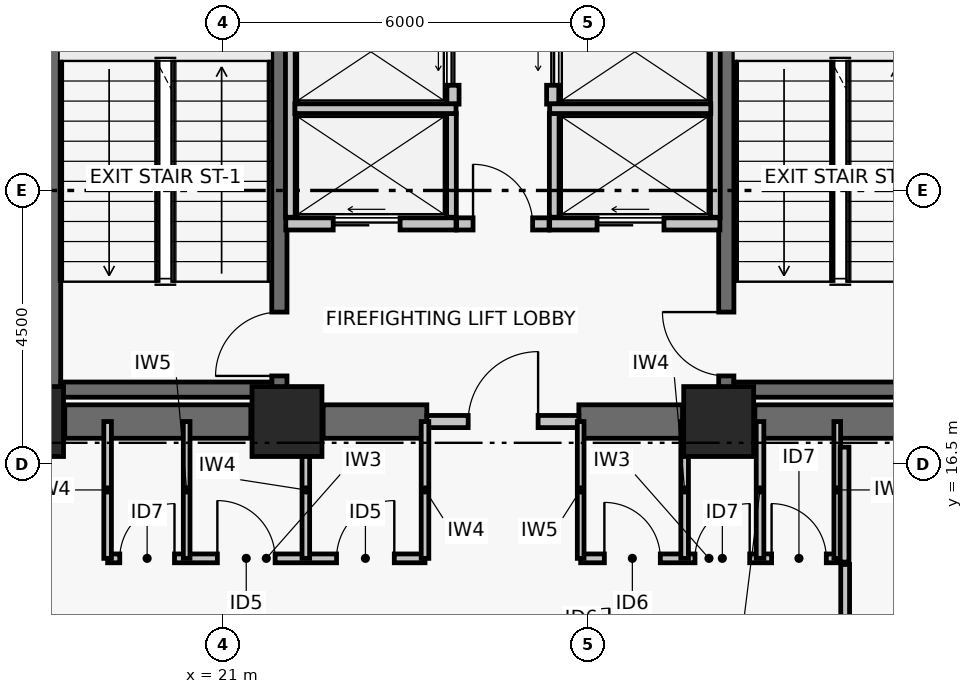
"""IFC4 building model, lengths in metres.
Left out: names, types, materials, properties, quantities, classifications, styles, units other than length and angle.
Written with IfcOpenShell. Run it as: python <this file> out.ifc"""

import sys

from ifc_helpers import new_model, si_unit, direction, frame, frame_2d, origin, origin_2d, place, context, subcontext, project, spatial, rectangle, extrude, element, fill, save


model = new_model("IFC4")
c1 = context("Model", 3, precision=1e-05, world=origin(), true_north=direction((0.0, 1.0)))
c2 = subcontext(c1, "Body", "Model", "MODEL_VIEW")
j1 = project(units=[si_unit("LENGTHUNIT", "METRE"), si_unit("PLANEANGLEUNIT", "RADIAN")], contexts=[c1])
p1 = place(None, origin())
s1 = spatial("IfcSite", under=j1, at=p1, CompositionType="ELEMENT")
p2 = place(p1, origin())
s2 = spatial("IfcBuilding", under=s1, at=p2, CompositionType="ELEMENT")
p3 = place(p2, frame((0.0, 0.0, 89.1)))
s3 = spatial("IfcBuildingStorey", under=s2, at=p3, CompositionType="ELEMENT", Elevation=89.1)
for number, where, z_axis, x_axis in (
    (1, (17.8, 17.2, 0.0), (0.0, 0.0, 1.0), (1.0, 0.0, 0.0)),
    (2, (22.05, 17.2, 0.0), (0.0, 0.0, 1.0), (1.0, 0.0, 0.0)),
    (3, (29.15, 17.2, 0.0), (0.0, 0.0, 1.0), (1.0, 0.0, 0.0)),
):
    element("IfcColumn", number, at=place(p3, frame(where, z_axis=z_axis, x_axis=x_axis)), inside=s3, PredefinedType="COLUMN", context=c2, shape_type="SweptSolid", body=[
        extrude(rectangle(XDim=1.15, YDim=1.15, at=origin_2d()), origin(), (0.0, 0.0, 1.0), 3.72),
    ])
p4 = place(p3, frame((18.395, 17.2, 0.0), z_axis=(0.0, 0.0, 1.0), x_axis=(1.0, 0.0, 0.0)))
e4 = element("IfcWall", 4, at=p4, inside=s3, PredefinedType="SHEAR", context=c2, shape_type="SweptSolid", body=[
    extrude(rectangle(XDim=3.06, YDim=0.55, at=frame_2d((1.53, 0.0))), origin(), (0.0, 0.0, 1.0), 3.47),
])
p5 = place(p3, frame((22.645, 17.2, 0.0), z_axis=(0.0, 0.0, 1.0), x_axis=(1.0, 0.0, 0.0)))
e5 = element("IfcWall", 5, at=p5, inside=s3, PredefinedType="SHEAR", context=c2, shape_type="SweptSolid", body=[
    extrude(rectangle(XDim=1.705, YDim=0.55, at=frame_2d((0.853, 0.0))), origin(), (0.0, 0.0, 1.0), 3.47),
])
p6 = place(p3, frame((26.85, 17.2, 0.0), z_axis=(0.0, 0.0, 1.0), x_axis=(1.0, 0.0, 0.0)))
e6 = element("IfcWall", 6, at=p6, inside=s3, PredefinedType="SHEAR", context=c2, shape_type="SweptSolid", body=[
    extrude(rectangle(XDim=1.705, YDim=0.55, at=frame_2d((0.853, 0.0))), origin(), (0.0, 0.0, 1.0), 3.47),
])
p7 = place(p3, frame((29.745, 17.2, 0.0), z_axis=(0.0, 0.0, 1.0), x_axis=(1.0, 0.0, 0.0)))
e7 = element("IfcWall", 7, at=p7, inside=s3, PredefinedType="SHEAR", context=c2, shape_type="SweptSolid", body=[
    extrude(rectangle(XDim=3.06, YDim=0.55, at=frame_2d((1.53, 0.0))), origin(), (0.0, 0.0, 1.0), 3.47),
])
p8 = place(p3, frame((18.204, 17.6, 0.0), z_axis=(0.0, 0.0, 1.0), x_axis=(0.0, 1.0, 0.0)))
e8 = element("IfcWall", 8, at=p8, inside=s3, PredefinedType="SHEAR", context=c2, shape_type="SweptSolid", body=[
    extrude(rectangle(XDim=8.8, YDim=0.25, at=frame_2d((4.4, 0.0))), origin(), (0.0, 0.0, 1.0), 3.47),
])
p9 = place(p3, frame((21.925, 17.6, 0.0), z_axis=(0.0, 0.0, 1.0), x_axis=(0.0, 1.0, 0.0)))
e9 = element("IfcWall", 9, at=p9, inside=s3, PredefinedType="SHEAR", context=c2, shape_type="SweptSolid", body=[
    extrude(rectangle(XDim=8.8, YDim=0.25, at=frame_2d((4.4, 0.0))), origin(), (0.0, 0.0, 1.0), 3.47),
])
p10 = place(p9, frame((0.35, 0.0, 0.0)))
e10 = element("IfcOpeningElement", 10, at=p10, cuts=e9, PredefinedType="OPENING", context=c2, shape_type="SweptSolid", body=[
    extrude(rectangle(XDim=1.05, YDim=2.08, at=frame_2d((0.525, 1.04))), frame((0.0, 0.135, 0.0), z_axis=(0.0, -1.0, 0.0), x_axis=(1.0, 0.0, 0.0)), (0.0, 0.0, 1.0), 0.27),
])
p11 = place(p3, frame((18.329, 17.725, 0.0), z_axis=(0.0, 0.0, 1.0), x_axis=(1.0, 0.0, 0.0)))
e11 = element("IfcWall", 11, at=p11, inside=s3, PredefinedType="SHEAR", context=c2, shape_type="SweptSolid", body=[
    extrude(rectangle(XDim=3.471, YDim=0.25, at=frame_2d((1.735, 0.0))), origin(), (0.0, 0.0, 1.0), 3.47),
])
p12 = place(p3, frame((29.275, 17.6, 0.0), z_axis=(0.0, 0.0, 1.0), x_axis=(0.0, 1.0, 0.0)))
e12 = element("IfcWall", 12, at=p12, inside=s3, PredefinedType="SHEAR", context=c2, shape_type="SweptSolid", body=[
    extrude(rectangle(XDim=8.8, YDim=0.25, at=frame_2d((4.4, 0.0))), origin(), (0.0, 0.0, 1.0), 3.47),
])
p13 = place(p12, frame((0.35, 0.0, 0.0)))
e13 = element("IfcOpeningElement", 13, at=p13, cuts=e12, PredefinedType="OPENING", context=c2, shape_type="SweptSolid", body=[
    extrude(rectangle(XDim=1.05, YDim=2.08, at=frame_2d((0.525, 1.04))), frame((0.0, 0.135, 0.0), z_axis=(0.0, -1.0, 0.0), x_axis=(1.0, 0.0, 0.0)), (0.0, 0.0, 1.0), 0.27),
])
p14 = place(p3, frame((29.4, 17.725, 0.0), z_axis=(0.0, 0.0, 1.0), x_axis=(1.0, 0.0, 0.0)))
e14 = element("IfcWall", 14, at=p14, inside=s3, PredefinedType="SHEAR", context=c2, shape_type="SweptSolid", body=[
    extrude(rectangle(XDim=3.471, YDim=0.25, at=frame_2d((1.736, 0.0))), origin(), (0.0, 0.0, 1.0), 3.47),
])
p15 = place(p3, frame((24.35, 17.2, 0.0), z_axis=(0.0, 0.0, 1.0), x_axis=(1.0, 0.0, 0.0)))
e15 = element("IfcWall", 15, at=p15, inside=s3, PredefinedType="PARTITIONING", context=c2, shape_type="SweptSolid", body=[
    extrude(rectangle(XDim=2.5, YDim=0.2, at=frame_2d((1.25, 0.0))), origin(), (0.0, 0.0, 1.0), 2.6),
])
p16 = place(p15, frame((0.68, 0.0, 0.0)))
e16 = element("IfcOpeningElement", 16, at=p16, cuts=e15, PredefinedType="OPENING", context=c2, shape_type="SweptSolid", body=[
    extrude(rectangle(XDim=1.15, YDim=2.08, at=frame_2d((0.575, 1.04))), frame((0.0, 0.11, 0.0), z_axis=(0.0, -1.0, 0.0), x_axis=(1.0, 0.0, 0.0)), (0.0, 0.0, 1.0), 0.22),
])
p17 = place(p3, frame((24.84, 20.45, 0.0), z_axis=(0.0, 0.0, 1.0), x_axis=(1.0, 0.0, 0.0)))
e17 = element("IfcWall", 17, at=p17, inside=s3, PredefinedType="PARTITIONING", context=c2, shape_type="SweptSolid", body=[
    extrude(rectangle(XDim=1.52, YDim=0.2, at=frame_2d((0.76, 0.0))), origin(), (0.0, 0.0, 1.0), 3.47),
])
p18 = place(p17, frame((0.27, 0.0, 0.0)))
e18 = element("IfcOpeningElement", 18, at=p18, cuts=e17, PredefinedType="OPENING", context=c2, shape_type="SweptSolid", body=[
    extrude(rectangle(XDim=0.98, YDim=2.06, at=frame_2d((0.49, 1.03))), frame((0.0, 0.11, 0.0), z_axis=(0.0, -1.0, 0.0), x_axis=(1.0, 0.0, 0.0)), (0.0, 0.0, 1.0), 0.22),
])
p19 = place(p3, frame((22.03, 20.45, 0.0), z_axis=(0.0, 0.0, 1.0), x_axis=(1.0, 0.0, 0.0)))
e19 = element("IfcWall", 19, at=p19, inside=s3, PredefinedType="PARTITIONING", context=c2, shape_type="SweptSolid", body=[
    extrude(rectangle(XDim=2.8, YDim=0.2, at=frame_2d((1.4, 0.0))), origin(), (0.0, 0.0, 1.0), 3.47),
])
p20 = place(p19, frame((0.78, 0.0, 0.0)))
e20 = element("IfcOpeningElement", 20, at=p20, cuts=e19, PredefinedType="OPENING", context=c2, shape_type="SweptSolid", body=[
    extrude(rectangle(XDim=1.1, YDim=2.08, at=frame_2d((0.55, 1.04))), frame((0.0, 0.11, 0.0), z_axis=(0.0, -1.0, 0.0), x_axis=(1.0, 0.0, 0.0)), (0.0, 0.0, 1.0), 0.22),
])
p21 = place(p3, frame((26.37, 20.45, 0.0), z_axis=(0.0, 0.0, 1.0), x_axis=(1.0, 0.0, 0.0)))
e21 = element("IfcWall", 21, at=p21, inside=s3, PredefinedType="PARTITIONING", context=c2, shape_type="SweptSolid", body=[
    extrude(rectangle(XDim=2.8, YDim=0.2, at=frame_2d((1.4, 0.0))), origin(), (0.0, 0.0, 1.0), 3.47),
])
p22 = place(p21, frame((0.78, 0.0, 0.0)))
e22 = element("IfcOpeningElement", 22, at=p22, cuts=e21, PredefinedType="OPENING", context=c2, shape_type="SweptSolid", body=[
    extrude(rectangle(XDim=1.1, YDim=2.08, at=frame_2d((0.55, 1.04))), frame((0.0, 0.11, 0.0), z_axis=(0.0, -1.0, 0.0), x_axis=(1.0, 0.0, 0.0)), (0.0, 0.0, 1.0), 0.22),
])
p23 = place(p3, frame((24.78, 22.42, 0.0), z_axis=(0.0, 0.0, 1.0), x_axis=(0.0, 1.0, 0.0)))
e23 = element("IfcWall", 23, at=p23, inside=s3, PredefinedType="PARTITIONING", context=c2, shape_type="SweptSolid", body=[
    extrude(rectangle(XDim=1.72, YDim=0.2, at=frame_2d((0.86, 0.0))), origin(), (0.0, 0.0, 1.0), 3.47),
])
p24 = place(p23, frame((0.31, 0.0, 0.0)))
e24 = element("IfcOpeningElement", 24, at=p24, cuts=e23, PredefinedType="OPENING", context=c2, shape_type="SweptSolid", body=[
    extrude(rectangle(XDim=1.1, YDim=2.08, at=frame_2d((0.55, 1.04))), frame((0.0, 0.11, 0.0), z_axis=(0.0, -1.0, 0.0), x_axis=(1.0, 0.0, 0.0)), (0.0, 0.0, 1.0), 0.22),
])
p25 = place(p3, frame((26.42, 22.42, 0.0), z_axis=(0.0, 0.0, 1.0), x_axis=(0.0, 1.0, 0.0)))
e25 = element("IfcWall", 25, at=p25, inside=s3, PredefinedType="PARTITIONING", context=c2, shape_type="SweptSolid", body=[
    extrude(rectangle(XDim=1.72, YDim=0.2, at=frame_2d((0.86, 0.0))), origin(), (0.0, 0.0, 1.0), 3.47),
])
p26 = place(p25, frame((0.31, 0.0, 0.0)))
e26 = element("IfcOpeningElement", 26, at=p26, cuts=e25, PredefinedType="OPENING", context=c2, shape_type="SweptSolid", body=[
    extrude(rectangle(XDim=1.1, YDim=2.08, at=frame_2d((0.55, 1.04))), frame((0.0, 0.11, 0.0), z_axis=(0.0, -1.0, 0.0), x_axis=(1.0, 0.0, 0.0)), (0.0, 0.0, 1.0), 0.22),
])
p27 = place(p3, frame((22.105, 20.56, 0.0), z_axis=(0.0, 0.0, 1.0), x_axis=(0.0, 1.0, 0.0)))
e27 = element("IfcWall", 27, at=p27, inside=s3, PredefinedType="PARTITIONING", context=c2, shape_type="SweptSolid", body=[
    extrude(rectangle(XDim=5.45, YDim=0.16, at=frame_2d((2.725, 0.0))), origin(), (0.0, 0.0, 1.0), 3.47),
])
p28 = place(p3, frame((24.755, 20.56, 0.0), z_axis=(0.0, 0.0, 1.0), x_axis=(0.0, 1.0, 0.0)))
e28 = element("IfcWall", 28, at=p28, inside=s3, PredefinedType="PARTITIONING", context=c2, shape_type="SweptSolid", body=[
    extrude(rectangle(XDim=1.71, YDim=0.16, at=frame_2d((0.855, 0.0))), origin(), (0.0, 0.0, 1.0), 3.47),
])
p29 = place(p3, frame((22.18, 22.345, 0.0), z_axis=(0.0, 0.0, 1.0), x_axis=(1.0, 0.0, 0.0)))
e29 = element("IfcWall", 29, at=p29, inside=s3, PredefinedType="PARTITIONING", context=c2, shape_type="SweptSolid", body=[
    extrude(rectangle(XDim=2.65, YDim=0.16, at=frame_2d((1.325, 0.0))), origin(), (0.0, 0.0, 1.0), 3.47),
])
p30 = place(p3, frame((29.095, 20.56, 0.0), z_axis=(0.0, 0.0, 1.0), x_axis=(0.0, 1.0, 0.0)))
e30 = element("IfcWall", 30, at=p30, inside=s3, PredefinedType="PARTITIONING", context=c2, shape_type="SweptSolid", body=[
    extrude(rectangle(XDim=5.45, YDim=0.16, at=frame_2d((2.725, 0.0))), origin(), (0.0, 0.0, 1.0), 3.47),
])
p31 = place(p3, frame((26.445, 20.56, 0.0), z_axis=(0.0, 0.0, 1.0), x_axis=(0.0, 1.0, 0.0)))
e31 = element("IfcWall", 31, at=p31, inside=s3, PredefinedType="PARTITIONING", context=c2, shape_type="SweptSolid", body=[
    extrude(rectangle(XDim=1.71, YDim=0.16, at=frame_2d((0.855, 0.0))), origin(), (0.0, 0.0, 1.0), 3.47),
])
p32 = place(p3, frame((26.37, 22.345, 0.0), z_axis=(0.0, 0.0, 1.0), x_axis=(1.0, 0.0, 0.0)))
e32 = element("IfcWall", 32, at=p32, inside=s3, PredefinedType="PARTITIONING", context=c2, shape_type="SweptSolid", body=[
    extrude(rectangle(XDim=2.65, YDim=0.16, at=frame_2d((1.325, 0.0))), origin(), (0.0, 0.0, 1.0), 3.47),
])
p33 = place(p3, frame((19.1, 14.95, 0.0), z_axis=(0.0, 0.0, 1.0), x_axis=(1.0, 0.0, 0.0)))
e33 = element("IfcWall", 33, at=p33, inside=s3, PredefinedType="PARTITIONING", context=c2, shape_type="SweptSolid", body=[
    extrude(rectangle(XDim=5.22, YDim=0.145, at=frame_2d((2.61, 0.0))), origin(), (0.0, 0.0, 1.0), 2.65),
])
p34 = place(p33, frame((0.2, 0.0, 0.0)))
e34 = element("IfcOpeningElement", 34, at=p34, cuts=e33, PredefinedType="OPENING", context=c2, shape_type="SweptSolid", body=[
    extrude(rectangle(XDim=0.9, YDim=2.02, at=frame_2d((0.45, 1.01))), frame((0.0, 0.083, 0.0), z_axis=(0.0, -1.0, 0.0), x_axis=(1.0, 0.0, 0.0)), (0.0, 0.0, 1.0), 0.165),
])
p35 = place(p33, frame((1.805, 0.0, 0.0)))
e35 = element("IfcOpeningElement", 35, at=p35, cuts=e33, PredefinedType="OPENING", context=c2, shape_type="SweptSolid", body=[
    extrude(rectangle(XDim=0.95, YDim=2.06, at=frame_2d((0.475, 1.03))), frame((0.0, 0.083, 0.0), z_axis=(0.0, -1.0, 0.0), x_axis=(1.0, 0.0, 0.0)), (0.0, 0.0, 1.0), 0.165),
])
p36 = place(p33, frame((3.765, 0.0, 0.0)))
e36 = element("IfcOpeningElement", 36, at=p36, cuts=e33, PredefinedType="OPENING", context=c2, shape_type="SweptSolid", body=[
    extrude(rectangle(XDim=0.95, YDim=2.06, at=frame_2d((0.475, 1.03))), frame((0.0, 0.083, 0.0), z_axis=(0.0, -1.0, 0.0), x_axis=(1.0, 0.0, 0.0)), (0.0, 0.0, 1.0), 0.165),
])
p37 = place(p3, frame((26.88, 14.95, 0.0), z_axis=(0.0, 0.0, 1.0), x_axis=(1.0, 0.0, 0.0)))
e37 = element("IfcWall", 37, at=p37, inside=s3, PredefinedType="PARTITIONING", context=c2, shape_type="SweptSolid", body=[
    extrude(rectangle(XDim=4.22, YDim=0.145, at=frame_2d((2.11, 0.0))), origin(), (0.0, 0.0, 1.0), 3.05),
])
p38 = place(p37, frame((0.39, 0.0, 0.0)))
e38 = element("IfcOpeningElement", 38, at=p38, cuts=e37, PredefinedType="OPENING", context=c2, shape_type="SweptSolid", body=[
    extrude(rectangle(XDim=0.92, YDim=2.05, at=frame_2d((0.46, 1.025))), frame((0.0, 0.083, 0.0), z_axis=(0.0, -1.0, 0.0), x_axis=(1.0, 0.0, 0.0)), (0.0, 0.0, 1.0), 0.165),
])
p39 = place(p37, frame((1.88, 0.0, 0.0)))
e39 = element("IfcOpeningElement", 39, at=p39, cuts=e37, PredefinedType="OPENING", context=c2, shape_type="SweptSolid", body=[
    extrude(rectangle(XDim=0.9, YDim=2.02, at=frame_2d((0.45, 1.01))), frame((0.0, 0.083, 0.0), z_axis=(0.0, -1.0, 0.0), x_axis=(1.0, 0.0, 0.0)), (0.0, 0.0, 1.0), 0.165),
])
p40 = place(p37, frame((3.14, 0.0, 0.0)))
e40 = element("IfcOpeningElement", 40, at=p40, cuts=e37, PredefinedType="OPENING", context=c2, shape_type="SweptSolid", body=[
    extrude(rectangle(XDim=0.9, YDim=2.02, at=frame_2d((0.45, 1.01))), frame((0.0, 0.083, 0.0), z_axis=(0.0, -1.0, 0.0), x_axis=(1.0, 0.0, 0.0)), (0.0, 0.0, 1.0), 0.165),
])
p41 = place(p3, frame((19.1, 14.95, 0.0), z_axis=(0.0, 0.0, 1.0), x_axis=(0.0, 1.0, 0.0)))
e41 = element("IfcWall", 41, at=p41, inside=s3, PredefinedType="PARTITIONING", context=c2, shape_type="SweptSolid", body=[
    extrude(rectangle(XDim=2.25, YDim=0.125, at=frame_2d((1.125, 0.0))), origin(), (0.0, 0.0, 1.0), 2.6),
])
p42 = place(p3, frame((20.4, 14.95, 0.0), z_axis=(0.0, 0.0, 1.0), x_axis=(0.0, 1.0, 0.0)))
e42 = element("IfcWall", 42, at=p42, inside=s3, PredefinedType="PARTITIONING", context=c2, shape_type="SweptSolid", body=[
    extrude(rectangle(XDim=2.25, YDim=0.11, at=frame_2d((1.125, 0.0))), origin(), (0.0, 0.0, 1.0), 2.6),
])
for number, where, z_axis, x_axis in (
    (43, (22.36, 14.95, 0.0), (0.0, 0.0, 1.0), (0.0, 1.0, 0.0)),
    (44, (24.32, 14.95, 0.0), (0.0, 0.0, 1.0), (0.0, 1.0, 0.0)),
):
    element("IfcWall", number, at=place(p3, frame(where, z_axis=z_axis, x_axis=x_axis)), inside=s3, PredefinedType="PARTITIONING", context=c2, shape_type="SweptSolid", body=[
        extrude(rectangle(XDim=2.25, YDim=0.125, at=frame_2d((1.125, 0.0))), origin(), (0.0, 0.0, 1.0), 2.6),
    ])
p43 = place(p3, frame((26.88, 14.95, 0.0), z_axis=(0.0, 0.0, 1.0), x_axis=(0.0, 1.0, 0.0)))
e45 = element("IfcWall", 45, at=p43, inside=s3, PredefinedType="PARTITIONING", context=c2, shape_type="SweptSolid", body=[
    extrude(rectangle(XDim=2.25, YDim=0.11, at=frame_2d((1.125, 0.0))), origin(), (0.0, 0.0, 1.0), 2.6),
])
for number, where, z_axis, x_axis in (
    (46, (28.59, 14.95, 0.0), (0.0, 0.0, 1.0), (0.0, 1.0, 0.0)),
    (47, (29.83, 14.95, 0.0), (0.0, 0.0, 1.0), (0.0, 1.0, 0.0)),
):
    element("IfcWall", number, at=place(p3, frame(where, z_axis=z_axis, x_axis=x_axis)), inside=s3, PredefinedType="PARTITIONING", context=c2, shape_type="SweptSolid", body=[
        extrude(rectangle(XDim=2.25, YDim=0.125, at=frame_2d((1.125, 0.0))), origin(), (0.0, 0.0, 1.0), 2.6),
    ])
p44 = place(p3, frame((31.1, 14.95, 0.0), z_axis=(0.0, 0.0, 1.0), x_axis=(0.0, 1.0, 0.0)))
e48 = element("IfcWall", 48, at=p44, inside=s3, PredefinedType="PARTITIONING", context=c2, shape_type="SweptSolid", body=[
    extrude(rectangle(XDim=2.25, YDim=0.11, at=frame_2d((1.125, 0.0))), origin(), (0.0, 0.0, 1.0), 2.6),
])
p45 = place(p3, frame((31.23, 13.351, 0.0), z_axis=(0.0, 0.0, 1.0), x_axis=(0.0, 1.0, 0.0)))
e49 = element("IfcWall", 49, at=p45, inside=s3, PredefinedType="PARTITIONING", context=c2, shape_type="SweptSolid", body=[
    extrude(rectangle(XDim=1.499, YDim=0.145, at=frame_2d((0.75, 0.0))), origin(), (0.0, 0.0, 1.0), 2.85),
])
p46 = place(p3, frame((31.22, 14.889, 0.0), z_axis=(0.0, 0.0, 1.0), x_axis=(0.0, 1.0, 0.0)))
e50 = element("IfcWall", 50, at=p46, inside=s3, PredefinedType="PARTITIONING", context=c2, shape_type="SweptSolid", body=[
    extrude(rectangle(XDim=1.891, YDim=0.145, at=frame_2d((0.946, 0.0))), origin(), (0.0, 0.0, 1.0), 2.6),
])
p47 = place(p10, origin())
e51 = element("IfcDoor", 51, at=p47, inside=s3, OperationType="SINGLE_SWING_LEFT", PredefinedType="DOOR", context=c2, shape_type="SweptSolid", body=[
    extrude(rectangle(XDim=1.05, YDim=2.08, at=frame_2d((0.525, 1.04))), frame((0.0, 0.025, 0.0), z_axis=(0.0, -1.0, 0.0), x_axis=(1.0, 0.0, 0.0)), (0.0, 0.0, 1.0), 0.05),
])
fill(e10, e51)
p48 = place(p13, origin())
e52 = element("IfcDoor", 52, at=p48, inside=s3, OperationType="SINGLE_SWING_RIGHT", PredefinedType="DOOR", context=c2, shape_type="SweptSolid", body=[
    extrude(rectangle(XDim=1.05, YDim=2.08, at=frame_2d((0.525, 1.04))), frame((0.0, 0.025, 0.0), z_axis=(0.0, -1.0, 0.0), x_axis=(1.0, 0.0, 0.0)), (0.0, 0.0, 1.0), 0.05),
])
fill(e13, e52)
p49 = place(p16, origin())
e53 = element("IfcDoor", 53, at=p49, inside=s3, OperationType="SINGLE_SWING_RIGHT", PredefinedType="DOOR", context=c2, shape_type="SweptSolid", body=[
    extrude(rectangle(XDim=1.15, YDim=2.08, at=frame_2d((0.575, 1.04))), frame((0.0, 0.025, 0.0), z_axis=(0.0, -1.0, 0.0), x_axis=(1.0, 0.0, 0.0)), (0.0, 0.0, 1.0), 0.05),
])
fill(e16, e53)
p50 = place(p18, origin())
e54 = element("IfcDoor", 54, at=p50, inside=s3, OperationType="SINGLE_SWING_LEFT", PredefinedType="DOOR", context=c2, shape_type="SweptSolid", body=[
    extrude(rectangle(XDim=0.98, YDim=2.06, at=frame_2d((0.49, 1.03))), frame((0.0, 0.025, 0.0), z_axis=(0.0, -1.0, 0.0), x_axis=(1.0, 0.0, 0.0)), (0.0, 0.0, 1.0), 0.05),
])
fill(e18, e54)
p51 = place(p20, origin())
e55 = element("IfcDoor", 55, at=p51, inside=s3, OperationType="DOUBLE_DOOR_SLIDING", PredefinedType="DOOR", context=c2, shape_type="SweptSolid", body=[
    extrude(rectangle(XDim=1.1, YDim=2.08, at=frame_2d((0.55, 1.04))), frame((0.0, 0.025, 0.0), z_axis=(0.0, -1.0, 0.0), x_axis=(1.0, 0.0, 0.0)), (0.0, 0.0, 1.0), 0.05),
])
fill(e20, e55)
p52 = place(p22, origin())
e56 = element("IfcDoor", 56, at=p52, inside=s3, OperationType="DOUBLE_DOOR_SLIDING", PredefinedType="DOOR", context=c2, shape_type="SweptSolid", body=[
    extrude(rectangle(XDim=1.1, YDim=2.08, at=frame_2d((0.55, 1.04))), frame((0.0, 0.025, 0.0), z_axis=(0.0, -1.0, 0.0), x_axis=(1.0, 0.0, 0.0)), (0.0, 0.0, 1.0), 0.05),
])
fill(e22, e56)
p53 = place(p24, origin())
e57 = element("IfcDoor", 57, at=p53, inside=s3, OperationType="DOUBLE_DOOR_SLIDING", PredefinedType="DOOR", context=c2, shape_type="SweptSolid", body=[
    extrude(rectangle(XDim=1.1, YDim=2.08, at=frame_2d((0.55, 1.04))), frame((0.0, 0.025, 0.0), z_axis=(0.0, -1.0, 0.0), x_axis=(1.0, 0.0, 0.0)), (0.0, 0.0, 1.0), 0.05),
])
fill(e24, e57)
p54 = place(p26, origin())
e58 = element("IfcDoor", 58, at=p54, inside=s3, OperationType="DOUBLE_DOOR_SLIDING", PredefinedType="DOOR", context=c2, shape_type="SweptSolid", body=[
    extrude(rectangle(XDim=1.1, YDim=2.08, at=frame_2d((0.55, 1.04))), frame((0.0, 0.025, 0.0), z_axis=(0.0, -1.0, 0.0), x_axis=(1.0, 0.0, 0.0)), (0.0, 0.0, 1.0), 0.05),
])
fill(e26, e58)
p55 = place(p34, origin())
e59 = element("IfcDoor", 59, at=p55, inside=s3, OperationType="SINGLE_SWING_RIGHT", PredefinedType="DOOR", context=c2, shape_type="SweptSolid", body=[
    extrude(rectangle(XDim=0.9, YDim=2.02, at=frame_2d((0.45, 1.01))), frame((0.0, 0.025, 0.0), z_axis=(0.0, -1.0, 0.0), x_axis=(1.0, 0.0, 0.0)), (0.0, 0.0, 1.0), 0.05),
])
fill(e34, e59)
p56 = place(p35, origin())
e60 = element("IfcDoor", 60, at=p56, inside=s3, OperationType="SINGLE_SWING_LEFT", PredefinedType="DOOR", context=c2, shape_type="SweptSolid", body=[
    extrude(rectangle(XDim=0.95, YDim=2.06, at=frame_2d((0.475, 1.03))), frame((0.0, 0.025, 0.0), z_axis=(0.0, -1.0, 0.0), x_axis=(1.0, 0.0, 0.0)), (0.0, 0.0, 1.0), 0.05),
])
fill(e35, e60)
p57 = place(p36, origin())
e61 = element("IfcDoor", 61, at=p57, inside=s3, OperationType="SINGLE_SWING_RIGHT", PredefinedType="DOOR", context=c2, shape_type="SweptSolid", body=[
    extrude(rectangle(XDim=0.95, YDim=2.06, at=frame_2d((0.475, 1.03))), frame((0.0, 0.025, 0.0), z_axis=(0.0, -1.0, 0.0), x_axis=(1.0, 0.0, 0.0)), (0.0, 0.0, 1.0), 0.05),
])
fill(e36, e61)
p58 = place(p38, origin())
e62 = element("IfcDoor", 62, at=p58, inside=s3, OperationType="SINGLE_SWING_LEFT", PredefinedType="DOOR", context=c2, shape_type="SweptSolid", body=[
    extrude(rectangle(XDim=0.92, YDim=2.05, at=frame_2d((0.46, 1.025))), frame((0.0, 0.025, 0.0), z_axis=(0.0, -1.0, 0.0), x_axis=(1.0, 0.0, 0.0)), (0.0, 0.0, 1.0), 0.05),
])
fill(e38, e62)
p59 = place(p39, origin())
e63 = element("IfcDoor", 63, at=p59, inside=s3, OperationType="SINGLE_SWING_RIGHT", PredefinedType="DOOR", context=c2, shape_type="SweptSolid", body=[
    extrude(rectangle(XDim=0.9, YDim=2.02, at=frame_2d((0.45, 1.01))), frame((0.0, 0.025, 0.0), z_axis=(0.0, -1.0, 0.0), x_axis=(1.0, 0.0, 0.0)), (0.0, 0.0, 1.0), 0.05),
])
fill(e39, e63)
p60 = place(p40, origin())
e64 = element("IfcDoor", 64, at=p60, inside=s3, OperationType="SINGLE_SWING_LEFT", PredefinedType="DOOR", context=c2, shape_type="SweptSolid", body=[
    extrude(rectangle(XDim=0.9, YDim=2.02, at=frame_2d((0.45, 1.01))), frame((0.0, 0.025, 0.0), z_axis=(0.0, -1.0, 0.0), x_axis=(1.0, 0.0, 0.0)), (0.0, 0.0, 1.0), 0.05),
])
fill(e40, e64)
save(model, sys.argv[1])
